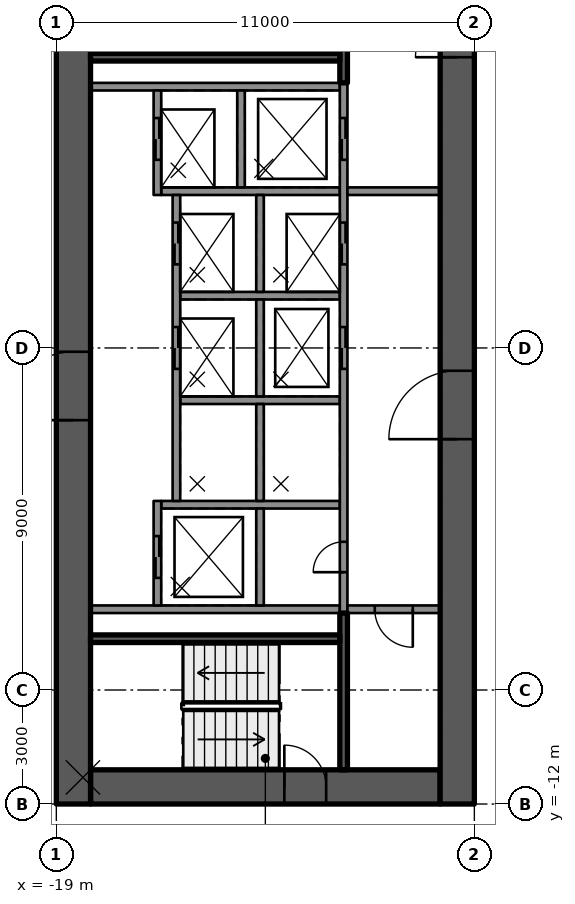
"""IFC4 building model, lengths in metres.
Left out: names, types, materials, properties, quantities, classifications, styles, units other than length and angle.
Written with IfcOpenShell. Run it as: python <this file> out.ifc"""

import sys

from ifc_helpers import new_model, si_unit, direction, frame, frame_2d, origin, place, context, subcontext, project, spatial, rectangle, extrude, element, fill, save


model = new_model("IFC4")
c1 = context("Model", 3, precision=1e-05, world=origin(), true_north=direction((0.0, 1.0)))
c2 = subcontext(c1, "Body", "Model", "MODEL_VIEW")
j1 = project(units=[si_unit("LENGTHUNIT", "METRE"), si_unit("PLANEANGLEUNIT", "RADIAN")], contexts=[c1])
p1 = place(None, origin())
s1 = spatial("IfcSite", under=j1, at=p1, CompositionType="ELEMENT")
p2 = place(p1, origin())
s2 = spatial("IfcBuilding", under=s1, at=p2, CompositionType="ELEMENT")
p3 = place(p2, frame((0.0, 0.0, 123.7)))
s3 = spatial("IfcBuildingStorey", under=s2, at=p3, CompositionType="ELEMENT", Elevation=123.7)
p4 = place(p3, frame((-18.1, -11.55, 0.0), z_axis=(0.0, 0.0, 1.0), x_axis=(1.0, 0.0, 0.0)))
e1 = element("IfcWall", 1, at=p4, inside=s3, PredefinedType="SHEAR", context=c2, shape_type="SweptSolid", body=[
    extrude(rectangle(XDim=9.2, YDim=0.9, at=frame_2d((4.6, 0.0))), origin(), (0.0, 0.0, 1.0), 3.5),
])
p5 = place(p4, frame((5.1, 0.0, 0.0)))
e2 = element("IfcOpeningElement", 2, at=p5, cuts=e1, PredefinedType="OPENING", context=c2, shape_type="SweptSolid", body=[
    extrude(rectangle(XDim=1.1, YDim=2.1, at=frame_2d((0.55, 1.05))), frame((0.0, 0.46, 0.0), z_axis=(0.0, -1.0, 0.0), x_axis=(1.0, 0.0, 0.0)), (0.0, 0.0, 1.0), 0.92),
])
p6 = place(p3, frame((-18.55, -12.0, 0.0), z_axis=(0.0, 0.0, 1.0), x_axis=(0.0, 1.0, 0.0)))
e3 = element("IfcWall", 3, at=p6, inside=s3, PredefinedType="SHEAR", context=c2, shape_type="SweptSolid", body=[
    extrude(rectangle(XDim=24.0, YDim=0.9, at=frame_2d((12.0, 0.0))), origin(), (0.0, 0.0, 1.0), 3.5),
])
p7 = place(p6, frame((10.1, 0.0, 0.0)))
e4 = element("IfcOpeningElement", 4, at=p7, cuts=e3, PredefinedType="OPENING", context=c2, shape_type="SweptSolid", body=[
    extrude(rectangle(XDim=1.8, YDim=2.1, at=frame_2d((0.9, 1.05))), frame((0.0, 0.46, 0.0), z_axis=(0.0, -1.0, 0.0), x_axis=(1.0, 0.0, 0.0)), (0.0, 0.0, 1.0), 0.92),
])
p8 = place(p3, frame((-8.45, -12.0, 0.0), z_axis=(0.0, 0.0, 1.0), x_axis=(0.0, 1.0, 0.0)))
e5 = element("IfcWall", 5, at=p8, inside=s3, PredefinedType="SHEAR", context=c2, shape_type="SweptSolid", body=[
    extrude(rectangle(XDim=24.0, YDim=0.9, at=frame_2d((12.0, 0.0))), origin(), (0.0, 0.0, 1.0), 3.5),
])
p9 = place(p8, frame((9.6, 0.0, 0.0)))
e6 = element("IfcOpeningElement", 6, at=p9, cuts=e5, PredefinedType="OPENING", context=c2, shape_type="SweptSolid", body=[
    extrude(rectangle(XDim=1.8, YDim=2.1, at=frame_2d((0.9, 1.05))), frame((0.0, 0.46, 0.0), z_axis=(0.0, -1.0, 0.0), x_axis=(1.0, 0.0, 0.0)), (0.0, 0.0, 1.0), 0.92),
])
p10 = place(p8, frame((19.65, 0.0, 0.0)))
e7 = element("IfcOpeningElement", 7, at=p10, cuts=e5, PredefinedType="OPENING", context=c2, shape_type="SweptSolid", body=[
    extrude(rectangle(XDim=1.1, YDim=2.1, at=frame_2d((0.55, 1.05))), frame((0.0, 0.46, 0.0), z_axis=(0.0, -1.0, 0.0), x_axis=(1.0, 0.0, 0.0)), (0.0, 0.0, 1.0), 0.92),
])
for number, where, z_axis, x_axis in (
    (8, (-11.54, 6.875, 0.0), (0.0, 0.0, 1.0), (-1.0, 0.0, 0.0)),
    (9, (-11.54, -6.875, 0.0), (0.0, 0.0, 1.0), (-1.0, 0.0, 0.0)),
):
    element("IfcWall", number, at=place(p3, frame(where, z_axis=z_axis, x_axis=x_axis)), inside=s3, PredefinedType="SOLIDWALL", context=c2, shape_type="SweptSolid", body=[
        extrude(rectangle(XDim=6.56, YDim=0.2, at=frame_2d((3.28, 0.0))), origin(), (0.0, 0.0, 1.0), 3.09),
    ])
p11 = place(p3, frame((-11.54, -4.125, 0.0), z_axis=(0.0, 0.0, 1.0), x_axis=(-1.0, 0.0, 0.0)))
e10 = element("IfcWall", 10, at=p11, inside=s3, PredefinedType="SOLIDWALL", context=c2, shape_type="SweptSolid", body=[
    extrude(rectangle(XDim=4.7, YDim=0.2, at=frame_2d((2.35, 0.0))), origin(), (0.0, 0.0, 1.0), 3.09),
])
for number, where, z_axis, x_axis in (
    (11, (-11.54, -1.375, 0.0), (0.0, 0.0, 1.0), (-1.0, 0.0, 0.0)),
    (12, (-11.54, 1.375, 0.0), (0.0, 0.0, 1.0), (-1.0, 0.0, 0.0)),
):
    element("IfcWall", number, at=place(p3, frame(where, z_axis=z_axis, x_axis=x_axis)), inside=s3, PredefinedType="SOLIDWALL", context=c2, shape_type="SweptSolid", body=[
        extrude(rectangle(XDim=4.2, YDim=0.2, at=frame_2d((2.1, 0.0))), origin(), (0.0, 0.0, 1.0), 3.09),
    ])
p12 = place(p3, frame((-11.54, 4.125, 0.0), z_axis=(0.0, 0.0, 1.0), x_axis=(-1.0, 0.0, 0.0)))
e13 = element("IfcWall", 13, at=p12, inside=s3, PredefinedType="SOLIDWALL", context=c2, shape_type="SweptSolid", body=[
    extrude(rectangle(XDim=4.7, YDim=0.2, at=frame_2d((2.35, 0.0))), origin(), (0.0, 0.0, 1.0), 3.09),
])
p13 = place(p3, frame((-11.44, -6.975, 0.0), z_axis=(0.0, 0.0, 1.0), x_axis=(0.0, 1.0, 0.0)))
e14 = element("IfcWall", 14, at=p13, inside=s3, PredefinedType="SOLIDWALL", context=c2, shape_type="SweptSolid", body=[
    extrude(rectangle(XDim=13.95, YDim=0.2, at=frame_2d((6.975, 0.0))), origin(), (0.0, 0.0, 1.0), 3.09),
])
p14 = place(p13, frame((6.425, 0.0, 0.0)))
e15 = element("IfcOpeningElement", 15, at=p14, cuts=e14, PredefinedType="OPENING", context=c2, shape_type="SweptSolid", body=[
    extrude(rectangle(XDim=1.1, YDim=2.1, at=frame_2d((0.55, 1.05))), frame((0.0, 0.11, 0.0), z_axis=(0.0, -1.0, 0.0), x_axis=(1.0, 0.0, 0.0)), (0.0, 0.0, 1.0), 0.22),
])
p15 = place(p13, frame((9.175, 0.0, 0.0)))
e16 = element("IfcOpeningElement", 16, at=p15, cuts=e14, PredefinedType="OPENING", context=c2, shape_type="SweptSolid", body=[
    extrude(rectangle(XDim=1.1, YDim=2.1, at=frame_2d((0.55, 1.05))), frame((0.0, 0.11, 0.0), z_axis=(0.0, -1.0, 0.0), x_axis=(1.0, 0.0, 0.0)), (0.0, 0.0, 1.0), 0.22),
])
p16 = place(p13, frame((11.925, 0.0, 0.0)))
e17 = element("IfcOpeningElement", 17, at=p16, cuts=e14, PredefinedType="OPENING", context=c2, shape_type="SweptSolid", body=[
    extrude(rectangle(XDim=1.1, YDim=2.1, at=frame_2d((0.55, 1.05))), frame((0.0, 0.11, 0.0), z_axis=(0.0, -1.0, 0.0), x_axis=(1.0, 0.0, 0.0)), (0.0, 0.0, 1.0), 0.22),
])
p17 = place(p13, frame((1.075, 0.0, 0.0)))
e18 = element("IfcOpeningElement", 18, at=p17, cuts=e14, PredefinedType="OPENING", context=c2, shape_type="SweptSolid", body=[
    extrude(rectangle(XDim=0.8, YDim=2.1, at=frame_2d((0.4, 1.05))), frame((0.0, 0.11, 0.0), z_axis=(0.0, -1.0, 0.0), x_axis=(1.0, 0.0, 0.0)), (0.0, 0.0, 1.0), 0.22),
])
for number, where, z_axis, x_axis in (
    (19, (-13.64, -6.775, 0.0), (0.0, 0.0, 1.0), (0.0, 1.0, 0.0)),
    (20, (-13.64, -4.025, 0.0), (0.0, 0.0, 1.0), (0.0, 1.0, 0.0)),
    (21, (-13.64, -1.275, 0.0), (0.0, 0.0, 1.0), (0.0, 1.0, 0.0)),
    (22, (-13.64, 1.475, 0.0), (0.0, 0.0, 1.0), (0.0, 1.0, 0.0)),
    (23, (-14.14, 4.225, 0.0), (0.0, 0.0, 1.0), (0.0, 1.0, 0.0)),
):
    element("IfcWall", number, at=place(p3, frame(where, z_axis=z_axis, x_axis=x_axis)), inside=s3, PredefinedType="SOLIDWALL", context=c2, shape_type="SweptSolid", body=[
        extrude(rectangle(XDim=2.55, YDim=0.2, at=frame_2d((1.275, 0.0))), origin(), (0.0, 0.0, 1.0), 3.09),
    ])
p18 = place(p3, frame((-16.34, -6.775, 0.0), z_axis=(0.0, 0.0, 1.0), x_axis=(0.0, 1.0, 0.0)))
e24 = element("IfcWall", 24, at=p18, inside=s3, PredefinedType="SOLIDWALL", context=c2, shape_type="SweptSolid", body=[
    extrude(rectangle(XDim=2.75, YDim=0.2, at=frame_2d((1.375, 0.0))), origin(), (0.0, 0.0, 1.0), 3.09),
])
p19 = place(p18, frame((0.725, 0.0, 0.0)))
e25 = element("IfcOpeningElement", 25, at=p19, cuts=e24, PredefinedType="OPENING", context=c2, shape_type="SweptSolid", body=[
    extrude(rectangle(XDim=1.1, YDim=2.1, at=frame_2d((0.55, 1.05))), frame((0.0, 0.11, 0.0), z_axis=(0.0, -1.0, 0.0), x_axis=(1.0, 0.0, 0.0)), (0.0, 0.0, 1.0), 0.22),
])
p20 = place(p3, frame((-15.84, -4.025, 0.0), z_axis=(0.0, 0.0, 1.0), x_axis=(0.0, 1.0, 0.0)))
e26 = element("IfcWall", 26, at=p20, inside=s3, PredefinedType="SOLIDWALL", context=c2, shape_type="SweptSolid", body=[
    extrude(rectangle(XDim=8.05, YDim=0.2, at=frame_2d((4.025, 0.0))), origin(), (0.0, 0.0, 1.0), 3.09),
])
p21 = place(p20, frame((3.475, 0.0, 0.0)))
e27 = element("IfcOpeningElement", 27, at=p21, cuts=e26, PredefinedType="OPENING", context=c2, shape_type="SweptSolid", body=[
    extrude(rectangle(XDim=1.1, YDim=2.1, at=frame_2d((0.55, 1.05))), frame((0.0, 0.11, 0.0), z_axis=(0.0, -1.0, 0.0), x_axis=(1.0, 0.0, 0.0)), (0.0, 0.0, 1.0), 0.22),
])
p22 = place(p20, frame((6.225, 0.0, 0.0)))
e28 = element("IfcOpeningElement", 28, at=p22, cuts=e26, PredefinedType="OPENING", context=c2, shape_type="SweptSolid", body=[
    extrude(rectangle(XDim=1.1, YDim=2.1, at=frame_2d((0.55, 1.05))), frame((0.0, 0.11, 0.0), z_axis=(0.0, -1.0, 0.0), x_axis=(1.0, 0.0, 0.0)), (0.0, 0.0, 1.0), 0.22),
])
p23 = place(p3, frame((-16.34, 4.025, 0.0), z_axis=(0.0, 0.0, 1.0), x_axis=(0.0, 1.0, 0.0)))
e29 = element("IfcWall", 29, at=p23, inside=s3, PredefinedType="SOLIDWALL", context=c2, shape_type="SweptSolid", body=[
    extrude(rectangle(XDim=2.75, YDim=0.2, at=frame_2d((1.375, 0.0))), origin(), (0.0, 0.0, 1.0), 3.09),
])
p24 = place(p23, frame((0.925, 0.0, 0.0)))
e30 = element("IfcOpeningElement", 30, at=p24, cuts=e29, PredefinedType="OPENING", context=c2, shape_type="SweptSolid", body=[
    extrude(rectangle(XDim=1.1, YDim=2.1, at=frame_2d((0.55, 1.05))), frame((0.0, 0.11, 0.0), z_axis=(0.0, -1.0, 0.0), x_axis=(1.0, 0.0, 0.0)), (0.0, 0.0, 1.0), 0.22),
])
p25 = place(p3, frame((-11.44, 6.975, 0.0), z_axis=(0.0, 0.0, 1.0), x_axis=(0.0, 1.0, 0.0)))
e31 = element("IfcWall", 31, at=p25, inside=s3, PredefinedType="SOLIDWALL", context=c2, shape_type="SweptSolid", body=[
    extrude(rectangle(XDim=4.125, YDim=0.2, at=frame_2d((2.062, 0.0))), origin(), (0.0, 0.0, 1.0), 3.09),
])
p26 = place(p25, frame((2.1, 0.0, 0.0)))
e32 = element("IfcOpeningElement", 32, at=p26, cuts=e31, PredefinedType="OPENING", context=c2, shape_type="SweptSolid", body=[
    extrude(rectangle(XDim=1.1, YDim=2.1, at=frame_2d((0.55, 1.05))), frame((0.0, 0.11, 0.0), z_axis=(0.0, -1.0, 0.0), x_axis=(1.0, 0.0, 0.0)), (0.0, 0.0, 1.0), 0.22),
])
p27 = place(p3, frame((-11.54, 7.65, 0.0), z_axis=(0.0, 0.0, 1.0), x_axis=(-1.0, 0.0, 0.0)))
e33 = element("IfcWall", 33, at=p27, inside=s3, PredefinedType="SOLIDWALL", context=c2, shape_type="SweptSolid", body=[
    extrude(rectangle(XDim=6.56, YDim=0.2, at=frame_2d((3.28, 0.0))), origin(), (0.0, 0.0, 1.0), 3.09),
])
p28 = place(p3, frame((-11.44, -11.1, 0.0), z_axis=(0.0, 0.0, 1.0), x_axis=(0.0, 1.0, 0.0)))
e34 = element("IfcWall", 34, at=p28, inside=s3, PredefinedType="SOLIDWALL", context=c2, shape_type="SweptSolid", body=[
    extrude(rectangle(XDim=4.125, YDim=0.2, at=frame_2d((2.062, 0.0))), origin(), (0.0, 0.0, 1.0), 3.09),
])
p29 = place(p3, frame((-11.54, -7.65, 0.0), z_axis=(0.0, 0.0, 1.0), x_axis=(-1.0, 0.0, 0.0)))
e35 = element("IfcWall", 35, at=p29, inside=s3, PredefinedType="SOLIDWALL", context=c2, shape_type="SweptSolid", body=[
    extrude(rectangle(XDim=6.56, YDim=0.2, at=frame_2d((3.28, 0.0))), origin(), (0.0, 0.0, 1.0), 3.09),
])
p30 = place(p3, frame((-8.9, 4.125, 0.0), z_axis=(0.0, 0.0, 1.0), x_axis=(-1.0, 0.0, 0.0)))
e36 = element("IfcWall", 36, at=p30, inside=s3, PredefinedType="PARTITIONING", context=c2, shape_type="SweptSolid", body=[
    extrude(rectangle(XDim=2.44, YDim=0.2, at=frame_2d((1.22, 0.0))), origin(), (0.0, 0.0, 1.0), 3.09),
])
p31 = place(p3, frame((-8.9, -6.875, 0.0), z_axis=(0.0, 0.0, 1.0), x_axis=(-1.0, 0.0, 0.0)))
e37 = element("IfcWall", 37, at=p31, inside=s3, PredefinedType="PARTITIONING", context=c2, shape_type="SweptSolid", body=[
    extrude(rectangle(XDim=2.44, YDim=0.2, at=frame_2d((1.22, 0.0))), origin(), (0.0, 0.0, 1.0), 3.09),
])
p32 = place(p31, frame((0.72, 0.0, 0.0)))
e38 = element("IfcOpeningElement", 38, at=p32, cuts=e37, PredefinedType="OPENING", context=c2, shape_type="SweptSolid", body=[
    extrude(rectangle(XDim=1.0, YDim=2.1, at=frame_2d((0.5, 1.05))), frame((0.0, 0.11, 0.0), z_axis=(0.0, -1.0, 0.0), x_axis=(1.0, 0.0, 0.0)), (0.0, 0.0, 1.0), 0.22),
])
p33 = place(p19, origin())
e39 = element("IfcDoor", 39, at=p33, inside=s3, OperationType="DOUBLE_DOOR_SLIDING", PredefinedType="DOOR", context=c2, shape_type="SweptSolid", body=[
    extrude(rectangle(XDim=1.1, YDim=2.1, at=frame_2d((0.55, 1.05))), frame((0.0, 0.025, 0.0), z_axis=(0.0, -1.0, 0.0), x_axis=(1.0, 0.0, 0.0)), (0.0, 0.0, 1.0), 0.05),
])
fill(e25, e39)
p34 = place(p14, origin())
e40 = element("IfcDoor", 40, at=p34, inside=s3, OperationType="DOUBLE_DOOR_SLIDING", PredefinedType="DOOR", context=c2, shape_type="SweptSolid", body=[
    extrude(rectangle(XDim=1.1, YDim=2.1, at=frame_2d((0.55, 1.05))), frame((0.0, 0.025, 0.0), z_axis=(0.0, -1.0, 0.0), x_axis=(1.0, 0.0, 0.0)), (0.0, 0.0, 1.0), 0.05),
])
fill(e15, e40)
p35 = place(p21, origin())
e41 = element("IfcDoor", 41, at=p35, inside=s3, OperationType="DOUBLE_DOOR_SLIDING", PredefinedType="DOOR", context=c2, shape_type="SweptSolid", body=[
    extrude(rectangle(XDim=1.1, YDim=2.1, at=frame_2d((0.55, 1.05))), frame((0.0, 0.025, 0.0), z_axis=(0.0, -1.0, 0.0), x_axis=(1.0, 0.0, 0.0)), (0.0, 0.0, 1.0), 0.05),
])
fill(e27, e41)
p36 = place(p15, origin())
e42 = element("IfcDoor", 42, at=p36, inside=s3, OperationType="DOUBLE_DOOR_SLIDING", PredefinedType="DOOR", context=c2, shape_type="SweptSolid", body=[
    extrude(rectangle(XDim=1.1, YDim=2.1, at=frame_2d((0.55, 1.05))), frame((0.0, 0.025, 0.0), z_axis=(0.0, -1.0, 0.0), x_axis=(1.0, 0.0, 0.0)), (0.0, 0.0, 1.0), 0.05),
])
fill(e16, e42)
p37 = place(p22, origin())
e43 = element("IfcDoor", 43, at=p37, inside=s3, OperationType="DOUBLE_DOOR_SLIDING", PredefinedType="DOOR", context=c2, shape_type="SweptSolid", body=[
    extrude(rectangle(XDim=1.1, YDim=2.1, at=frame_2d((0.55, 1.05))), frame((0.0, 0.025, 0.0), z_axis=(0.0, -1.0, 0.0), x_axis=(1.0, 0.0, 0.0)), (0.0, 0.0, 1.0), 0.05),
])
fill(e28, e43)
p38 = place(p16, origin())
e44 = element("IfcDoor", 44, at=p38, inside=s3, OperationType="DOUBLE_DOOR_SLIDING", PredefinedType="DOOR", context=c2, shape_type="SweptSolid", body=[
    extrude(rectangle(XDim=1.1, YDim=2.1, at=frame_2d((0.55, 1.05))), frame((0.0, 0.025, 0.0), z_axis=(0.0, -1.0, 0.0), x_axis=(1.0, 0.0, 0.0)), (0.0, 0.0, 1.0), 0.05),
])
fill(e17, e44)
p39 = place(p24, origin())
e45 = element("IfcDoor", 45, at=p39, inside=s3, OperationType="DOUBLE_DOOR_SLIDING", PredefinedType="DOOR", context=c2, shape_type="SweptSolid", body=[
    extrude(rectangle(XDim=1.1, YDim=2.1, at=frame_2d((0.55, 1.05))), frame((0.0, 0.025, 0.0), z_axis=(0.0, -1.0, 0.0), x_axis=(1.0, 0.0, 0.0)), (0.0, 0.0, 1.0), 0.05),
])
fill(e30, e45)
p40 = place(p17, origin())
e46 = element("IfcDoor", 46, at=p40, inside=s3, OperationType="SINGLE_SWING_LEFT", PredefinedType="DOOR", context=c2, shape_type="SweptSolid", body=[
    extrude(rectangle(XDim=0.8, YDim=2.1, at=frame_2d((0.4, 1.05))), frame((0.0, 0.025, 0.0), z_axis=(0.0, -1.0, 0.0), x_axis=(1.0, 0.0, 0.0)), (0.0, 0.0, 1.0), 0.05),
])
fill(e18, e46)
p41 = place(p9, origin())
e47 = element("IfcDoor", 47, at=p41, inside=s3, OperationType="SINGLE_SWING_LEFT", PredefinedType="DOOR", context=c2, shape_type="SweptSolid", body=[
    extrude(rectangle(XDim=1.8, YDim=2.1, at=frame_2d((0.9, 1.05))), frame((0.0, 0.025, 0.0), z_axis=(0.0, -1.0, 0.0), x_axis=(1.0, 0.0, 0.0)), (0.0, 0.0, 1.0), 0.05),
])
fill(e6, e47)
p42 = place(p7, origin())
e48 = element("IfcDoor", 48, at=p42, inside=s3, OperationType="SINGLE_SWING_LEFT", PredefinedType="DOOR", context=c2, shape_type="SweptSolid", body=[
    extrude(rectangle(XDim=1.8, YDim=2.1, at=frame_2d((0.9, 1.05))), frame((0.0, 0.025, 0.0), z_axis=(0.0, -1.0, 0.0), x_axis=(1.0, 0.0, 0.0)), (0.0, 0.0, 1.0), 0.05),
])
fill(e4, e48)
p43 = place(p10, origin())
e49 = element("IfcDoor", 49, at=p43, inside=s3, OperationType="SINGLE_SWING_RIGHT", PredefinedType="DOOR", context=c2, shape_type="SweptSolid", body=[
    extrude(rectangle(XDim=1.1, YDim=2.1, at=frame_2d((0.55, 1.05))), frame((0.0, 0.025, 0.0), z_axis=(0.0, -1.0, 0.0), x_axis=(1.0, 0.0, 0.0)), (0.0, 0.0, 1.0), 0.05),
])
fill(e7, e49)
p44 = place(p5, origin())
e50 = element("IfcDoor", 50, at=p44, inside=s3, OperationType="SINGLE_SWING_RIGHT", PredefinedType="DOOR", context=c2, shape_type="SweptSolid", body=[
    extrude(rectangle(XDim=1.1, YDim=2.1, at=frame_2d((0.55, 1.05))), frame((0.0, 0.025, 0.0), z_axis=(0.0, -1.0, 0.0), x_axis=(1.0, 0.0, 0.0)), (0.0, 0.0, 1.0), 0.05),
])
fill(e2, e50)
p45 = place(p32, origin())
e51 = element("IfcDoor", 51, at=p45, inside=s3, OperationType="SINGLE_SWING_RIGHT", PredefinedType="DOOR", context=c2, shape_type="SweptSolid", body=[
    extrude(rectangle(XDim=1.0, YDim=2.1, at=frame_2d((0.5, 1.05))), frame((0.0, 0.025, 0.0), z_axis=(0.0, -1.0, 0.0), x_axis=(1.0, 0.0, 0.0)), (0.0, 0.0, 1.0), 0.05),
])
fill(e38, e51)
save(model, sys.argv[1])
